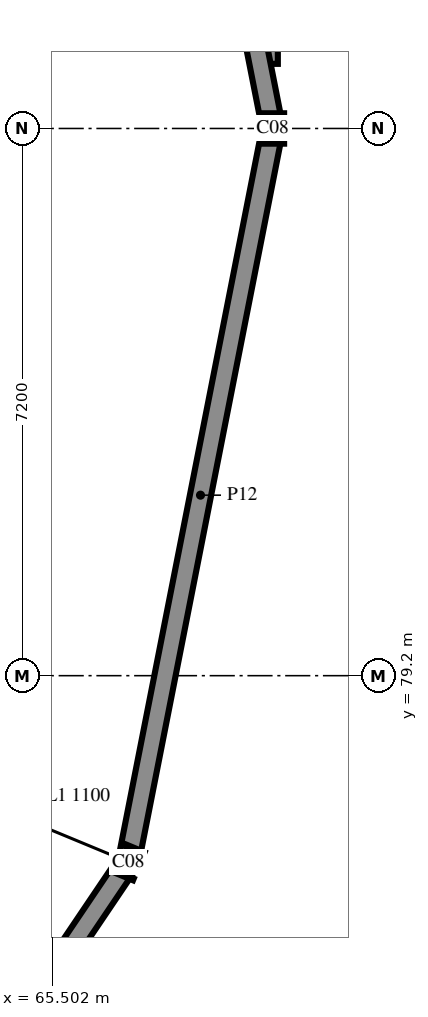
"""IFC4 building model, lengths in metres.
Left out: names, types, materials, properties, quantities, classifications, styles, units other than length and angle.
Written with IfcOpenShell. Run it as: python <this file> out.ifc"""

import sys

from ifc_helpers import new_model, si_unit, direction, frame, frame_2d, origin, origin_2d, place, context, subcontext, project, spatial, rectangle, i_section, extrude, element, save


model = new_model("IFC4")
c1 = context("Model", 3, precision=1e-05, world=origin(), true_north=direction((0.0, 1.0)))
c2 = subcontext(c1, "Body", "Model", "MODEL_VIEW")
j1 = project(units=[si_unit("LENGTHUNIT", "METRE"), si_unit("PLANEANGLEUNIT", "RADIAN")], contexts=[c1])
p1 = place(None, origin())
s1 = spatial("IfcSite", under=j1, at=p1, CompositionType="ELEMENT")
p2 = place(p1, origin())
s2 = spatial("IfcBuilding", under=s1, at=p2, CompositionType="ELEMENT")
p3 = place(p2, frame((0.0, 0.0, 14.4)))
s3 = spatial("IfcBuildingStorey", under=s2, at=p3, CompositionType="ELEMENT", Elevation=14.4)
for number, where, z_axis, x_axis in (
    (1, (68.4, 86.4, 0.0), (0.0, 0.0, 1.0), (1.0, 0.0, 0.0)),
    (2, (66.5, 76.75, 0.0), (0.0, 0.0, 1.0), (0.924, -0.383, 0.0)),
):
    element("IfcColumn", number, at=place(p3, frame(where, z_axis=z_axis, x_axis=x_axis)), inside=s3, PredefinedType="COLUMN", context=c2, shape_type="SweptSolid", body=[
        extrude(i_section(OverallWidth=0.3, OverallDepth=0.4, WebThickness=0.013, FlangeThickness=0.024, FilletRadius=0.027, at=origin_2d()), origin(), (0.0, 0.0, 1.0), 3.6),
    ])
p4 = place(p3, frame((68.4, 87.25, 0.0), z_axis=(0.0, 0.0, 1.0), x_axis=(0.0, 1.0, 0.0)))
e3 = element("IfcWall", 3, at=p4, inside=s3, PredefinedType="PARTITIONING", context=c2, shape_type="SweptSolid", body=[
    extrude(rectangle(XDim=5.732, YDim=0.135, at=frame_2d((2.866, 0.0))), origin(), (0.0, 0.0, 1.0), 3.42),
])
p5 = place(p3, frame((61.0, 68.6, 0.0), z_axis=(0.0, 0.0, 1.0), x_axis=(0.559390118145, 0.828904515443, 0.0)))
e4 = element("IfcWall", 4, at=p5, inside=s3, PredefinedType="PARTITIONING", context=c2, shape_type="SweptSolid", body=[
    extrude(rectangle(XDim=9.832, YDim=0.275, at=frame_2d((4.916, 0.0))), origin(), (0.0, 0.0, 1.0), 3.07),
])
p6 = place(p5, frame((3.85, 0.0, 0.0)))
e5 = element("IfcOpeningElement", 5, at=p6, cuts=e4, PredefinedType="OPENING", context=c2, shape_type="SweptSolid", body=[
    extrude(rectangle(XDim=2.1, YDim=2.4, at=frame_2d((1.05, 1.2))), frame((0.0, 0.147, 0.0), z_axis=(0.0, -1.0, 0.0), x_axis=(1.0, 0.0, 0.0)), (0.0, 0.0, 1.0), 0.295),
])
p7 = place(p3, frame((66.5, 76.75, 0.0), z_axis=(0.0, 0.0, 1.0), x_axis=(0.193174651092, 0.981164386928, 0.0)))
e6 = element("IfcWall", 6, at=p7, inside=s3, PredefinedType="PARTITIONING", context=c2, shape_type="SweptSolid", body=[
    extrude(rectangle(XDim=9.835, YDim=0.275, at=frame_2d((4.917, 0.0))), origin(), (0.0, 0.0, 1.0), 3.07),
])
p8 = place(p3, frame((68.4, 86.4, 0.0), z_axis=(0.0, 0.0, 1.0), x_axis=(-0.193155650747, 0.981168127583, 0.0)))
e7 = element("IfcWall", 7, at=p8, inside=s3, PredefinedType="PARTITIONING", context=c2, shape_type="SweptSolid", body=[
    extrude(rectangle(XDim=6.71, YDim=0.275, at=frame_2d((3.355, 0.0))), origin(), (0.0, 0.0, 1.0), 3.07),
])
save(model, sys.argv[1])
